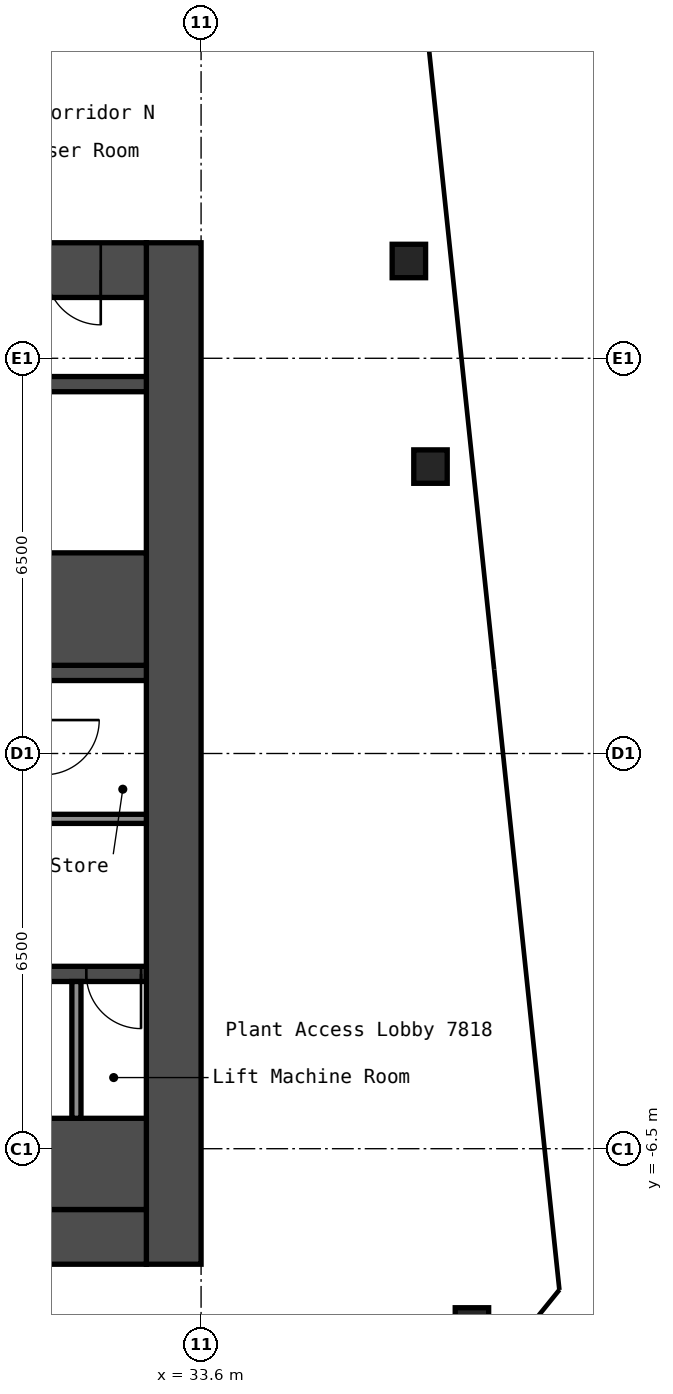
"""IFC4 building model, lengths in metres.
Left out: names, types, materials, properties, quantities, classifications, styles, units other than length and angle.
Written with IfcOpenShell. Run it as: python <this file> out.ifc"""

import sys

from ifc_helpers import new_model, si_unit, direction, frame, frame_2d, origin, origin_2d, place, context, subcontext, project, spatial, rectangle, hollow_rectangle, extrude, element, fill, save


model = new_model("IFC4")
c1 = context("Model", 3, precision=1e-05, world=origin(), true_north=direction((0.0, 1.0)))
c2 = subcontext(c1, "Body", "Model", "MODEL_VIEW")
j1 = project(units=[si_unit("LENGTHUNIT", "METRE"), si_unit("PLANEANGLEUNIT", "RADIAN")], contexts=[c1])
p1 = place(None, origin())
s1 = spatial("IfcSite", under=j1, at=p1, CompositionType="ELEMENT")
p2 = place(p1, origin())
s2 = spatial("IfcBuilding", under=s1, at=p2, CompositionType="ELEMENT")
p3 = place(p2, frame((0.0, 0.0, 280.8)))
s3 = spatial("IfcBuildingStorey", under=s2, at=p3, CompositionType="ELEMENT", Elevation=280.8)
for number, where, z_axis, x_axis in (
    (1, (38.054, -9.39, 0.0), (0.0, 0.0, 1.0), (1.0, 0.0, 0.0)),
    (2, (37.373, 4.719, 0.0), (0.0, 0.0, 1.0), (1.0, 0.0, 0.0)),
    (3, (37.017, 8.1, 0.0), (0.0, 0.0, 1.0), (1.0, 0.0, 0.0)),
):
    element("IfcColumn", number, at=place(p3, frame(where, z_axis=z_axis, x_axis=x_axis)), inside=s3, PredefinedType="COLUMN", context=c2, shape_type="SweptSolid", body=[
        extrude(hollow_rectangle(XDim=0.55, YDim=0.55, WallThickness=0.022, InnerFilletRadius=0.033, OuterFilletRadius=0.055, at=origin_2d()), origin(), (0.0, 0.0, 1.0), 4.0),
    ])
p4 = place(p3, frame((33.15, -8.4, 0.0), z_axis=(0.0, 0.0, 1.0), x_axis=(0.0, 1.0, 0.0)))
e4 = element("IfcWall", 4, at=p4, inside=s3, PredefinedType="SHEAR", context=c2, shape_type="SweptSolid", body=[
    extrude(rectangle(XDim=16.8, YDim=0.9, at=frame_2d((8.4, 0.0))), origin(), (0.0, 0.0, 1.0), 4.0),
])
p5 = place(p3, frame((17.7, 7.95, 0.0), z_axis=(0.0, 0.0, 1.0), x_axis=(1.0, 0.0, 0.0)))
e5 = element("IfcWall", 5, at=p5, inside=s3, PredefinedType="SHEAR", context=c2, shape_type="SweptSolid", body=[
    extrude(rectangle(XDim=15.0, YDim=0.9, at=frame_2d((7.5, 0.0))), origin(), (0.0, 0.0, 1.0), 4.0),
])
p6 = place(p5, frame((10.4, 0.0, 0.0)))
e6 = element("IfcOpeningElement", 6, at=p6, cuts=e5, PredefinedType="OPENING", context=c2, shape_type="SweptSolid", body=[
    extrude(rectangle(XDim=1.2, YDim=2.1, at=frame_2d((0.6, 1.05))), frame((0.0, 0.46, 0.0), z_axis=(0.0, -1.0, 0.0), x_axis=(1.0, 0.0, 0.0)), (0.0, 0.0, 1.0), 0.92),
])
p7 = place(p5, frame((13.35, 0.0, 0.0)))
e7 = element("IfcOpeningElement", 7, at=p7, cuts=e5, PredefinedType="OPENING", context=c2, shape_type="SweptSolid", body=[
    extrude(rectangle(XDim=0.9, YDim=2.1, at=frame_2d((0.45, 1.05))), frame((0.0, 0.46, 0.0), z_axis=(0.0, -1.0, 0.0), x_axis=(1.0, 0.0, 0.0)), (0.0, 0.0, 1.0), 0.92),
])
p8 = place(p3, frame((17.7, -7.95, 0.0), z_axis=(0.0, 0.0, 1.0), x_axis=(1.0, 0.0, 0.0)))
e8 = element("IfcWall", 8, at=p8, inside=s3, PredefinedType="SHEAR", context=c2, shape_type="SweptSolid", body=[
    extrude(rectangle(XDim=15.0, YDim=0.9, at=frame_2d((7.5, 0.0))), origin(), (0.0, 0.0, 1.0), 4.0),
])
p9 = place(p8, frame((2.55, 0.0, 0.0)))
e9 = element("IfcOpeningElement", 9, at=p9, cuts=e8, PredefinedType="OPENING", context=c2, shape_type="SweptSolid", body=[
    extrude(rectangle(XDim=1.0, YDim=2.1, at=frame_2d((0.5, 1.05))), frame((0.0, 0.46, 0.0), z_axis=(0.0, -1.0, 0.0), x_axis=(1.0, 0.0, 0.0)), (0.0, 0.0, 1.0), 0.92),
])
p10 = place(p3, frame((27.65, 1.325, 0.0), z_axis=(0.0, 0.0, 1.0), x_axis=(1.0, 0.0, 0.0)))
e10 = element("IfcWall", 10, at=p10, inside=s3, PredefinedType="SHEAR", context=c2, shape_type="SweptSolid", body=[
    extrude(rectangle(XDim=5.05, YDim=0.25, at=frame_2d((2.525, 0.0))), origin(), (0.0, 0.0, 1.0), 4.0),
])
p11 = place(p10, frame((0.55, 0.0, 0.0)))
e11 = element("IfcOpeningElement", 11, at=p11, cuts=e10, PredefinedType="OPENING", context=c2, shape_type="SweptSolid", body=[
    extrude(rectangle(XDim=1.2, YDim=2.1, at=frame_2d((0.6, 1.05))), frame((0.0, 0.135, 0.0), z_axis=(0.0, -1.0, 0.0), x_axis=(1.0, 0.0, 0.0)), (0.0, 0.0, 1.0), 0.27),
])
p12 = place(p3, frame((30.3, 2.375, 0.0), z_axis=(0.0, 0.0, 1.0), x_axis=(1.0, 0.0, 0.0)))
e12 = element("IfcWall", 12, at=p12, inside=s3, PredefinedType="SHEAR", context=c2, shape_type="SweptSolid", body=[
    extrude(rectangle(XDim=2.4, YDim=1.85, at=frame_2d((1.2, 0.0))), origin(), (0.0, 0.0, 1.0), 4.0),
])
p13 = place(p3, frame((30.3, 6.075, 0.0), z_axis=(0.0, 0.0, 1.0), x_axis=(1.0, 0.0, 0.0)))
e13 = element("IfcWall", 13, at=p13, inside=s3, PredefinedType="SHEAR", context=c2, shape_type="SweptSolid", body=[
    extrude(rectangle(XDim=2.4, YDim=0.25, at=frame_2d((1.2, 0.0))), origin(), (0.0, 0.0, 1.0), 4.0),
])
p14 = place(p3, frame((28.15, -3.625, 0.0), z_axis=(0.0, 0.0, 1.0), x_axis=(1.0, 0.0, 0.0)))
e14 = element("IfcWall", 14, at=p14, inside=s3, PredefinedType="SHEAR", context=c2, shape_type="SweptSolid", body=[
    extrude(rectangle(XDim=4.55, YDim=0.25, at=frame_2d((2.275, 0.0))), origin(), (0.0, 0.0, 1.0), 4.0),
])
p15 = place(p14, frame((0.087, 0.0, 0.0)))
e15 = element("IfcOpeningElement", 15, at=p15, cuts=e14, PredefinedType="OPENING", context=c2, shape_type="SweptSolid", body=[
    extrude(rectangle(XDim=0.9, YDim=2.1, at=frame_2d((0.45, 1.05))), frame((0.0, 0.135, 0.0), z_axis=(0.0, -1.0, 0.0), x_axis=(1.0, 0.0, 0.0)), (0.0, 0.0, 1.0), 0.27),
])
p16 = place(p14, frame((1.825, 0.0, 0.0)))
e16 = element("IfcOpeningElement", 16, at=p16, cuts=e14, PredefinedType="OPENING", context=c2, shape_type="SweptSolid", body=[
    extrude(rectangle(XDim=0.9, YDim=2.1, at=frame_2d((0.45, 1.05))), frame((0.0, 0.135, 0.0), z_axis=(0.0, -1.0, 0.0), x_axis=(1.0, 0.0, 0.0)), (0.0, 0.0, 1.0), 0.27),
])
p17 = place(p14, frame((3.562, 0.0, 0.0)))
e17 = element("IfcOpeningElement", 17, at=p17, cuts=e14, PredefinedType="OPENING", context=c2, shape_type="SweptSolid", body=[
    extrude(rectangle(XDim=0.9, YDim=2.1, at=frame_2d((0.45, 1.05))), frame((0.0, 0.135, 0.0), z_axis=(0.0, -1.0, 0.0), x_axis=(1.0, 0.0, 0.0)), (0.0, 0.0, 1.0), 0.27),
])
p18 = place(p3, frame((28.15, -6.75, 0.0), z_axis=(0.0, 0.0, 1.0), x_axis=(1.0, 0.0, 0.0)))
e18 = element("IfcWall", 18, at=p18, inside=s3, PredefinedType="SHEAR", context=c2, shape_type="SweptSolid", body=[
    extrude(rectangle(XDim=4.55, YDim=1.5, at=frame_2d((2.275, 0.0))), origin(), (0.0, 0.0, 1.0), 4.0),
])
p19 = place(p3, frame((31.1, -1.075, 0.0), z_axis=(0.0, 0.0, 1.0), x_axis=(1.0, 0.0, 0.0)))
e19 = element("IfcWall", 19, at=p19, inside=s3, PredefinedType="PARTITIONING", context=c2, shape_type="SweptSolid", body=[
    extrude(rectangle(XDim=1.6, YDim=0.15, at=frame_2d((0.8, 0.0))), origin(), (0.0, 0.0, 1.0), 4.0),
])
p20 = place(p3, frame((31.55, -6.0, 0.0), z_axis=(0.0, 0.0, 1.0), x_axis=(0.0, 1.0, 0.0)))
e20 = element("IfcWall", 20, at=p20, inside=s3, PredefinedType="PARTITIONING", context=c2, shape_type="SweptSolid", body=[
    extrude(rectangle(XDim=2.25, YDim=0.15, at=frame_2d((1.125, 0.0))), origin(), (0.0, 0.0, 1.0), 4.0),
])
p21 = place(p3, frame((16.048, 10.533, 0.0), z_axis=(0.0, 0.0, 1.0), x_axis=(0.994522460242, 0.104523088709, 0.0)))
e21 = element("IfcWall", 21, at=p21, inside=s3, PredefinedType="PARTITIONING", context=c2, shape_type="SweptSolid", body=[
    extrude(rectangle(XDim=21.3, YDim=0.2, at=frame_2d((10.65, 0.0))), origin(), (0.0, 0.0, 1.0), 4.0),
])
p22 = place(p21, frame((1.06, 0.0, 0.0)))
e22 = element("IfcOpeningElement", 22, at=p22, cuts=e21, PredefinedType="OPENING", context=c2, shape_type="SweptSolid", body=[
    extrude(rectangle(XDim=0.9, YDim=2.1, at=frame_2d((0.45, 1.05))), frame((0.0, 0.11, 0.0), z_axis=(0.0, -1.0, 0.0), x_axis=(1.0, 0.0, 0.0)), (0.0, 0.0, 1.0), 0.22),
])
p23 = place(p21, frame((5.26, 0.0, 0.0)))
e23 = element("IfcOpeningElement", 23, at=p23, cuts=e21, PredefinedType="OPENING", context=c2, shape_type="SweptSolid", body=[
    extrude(rectangle(XDim=0.9, YDim=2.1, at=frame_2d((0.45, 1.05))), frame((0.0, 0.11, 0.0), z_axis=(0.0, -1.0, 0.0), x_axis=(1.0, 0.0, 0.0)), (0.0, 0.0, 1.0), 0.22),
])
p24 = place(p21, frame((11.8, 0.0, 0.0)))
e24 = element("IfcOpeningElement", 24, at=p24, cuts=e21, PredefinedType="OPENING", context=c2, shape_type="SweptSolid", body=[
    extrude(rectangle(XDim=1.6, YDim=2.1, at=frame_2d((0.8, 1.05))), frame((0.0, 0.11, 0.0), z_axis=(0.0, -1.0, 0.0), x_axis=(1.0, 0.0, 0.0)), (0.0, 0.0, 1.0), 0.22),
])
p25 = place(p21, frame((18.45, 0.0, 0.0)))
e25 = element("IfcOpeningElement", 25, at=p25, cuts=e21, PredefinedType="OPENING", context=c2, shape_type="SweptSolid", body=[
    extrude(rectangle(XDim=0.9, YDim=2.1, at=frame_2d((0.45, 1.05))), frame((0.0, 0.11, 0.0), z_axis=(0.0, -1.0, 0.0), x_axis=(1.0, 0.0, 0.0)), (0.0, 0.0, 1.0), 0.22),
])
p26 = place(p7, origin())
e26 = element("IfcDoor", 26, at=p26, inside=s3, OperationType="SINGLE_SWING_RIGHT", PredefinedType="DOOR", context=c2, shape_type="SweptSolid", body=[
    extrude(rectangle(XDim=0.9, YDim=2.1, at=frame_2d((0.45, 1.05))), frame((0.0, 0.025, 0.0), z_axis=(0.0, -1.0, 0.0), x_axis=(1.0, 0.0, 0.0)), (0.0, 0.0, 1.0), 0.05),
])
fill(e7, e26)
p27 = place(p17, origin())
e27 = element("IfcDoor", 27, at=p27, inside=s3, OperationType="SINGLE_SWING_RIGHT", PredefinedType="DOOR", context=c2, shape_type="SweptSolid", body=[
    extrude(rectangle(XDim=0.9, YDim=2.1, at=frame_2d((0.45, 1.05))), frame((0.0, 0.025, 0.0), z_axis=(0.0, -1.0, 0.0), x_axis=(1.0, 0.0, 0.0)), (0.0, 0.0, 1.0), 0.05),
])
fill(e17, e27)
save(model, sys.argv[1])
